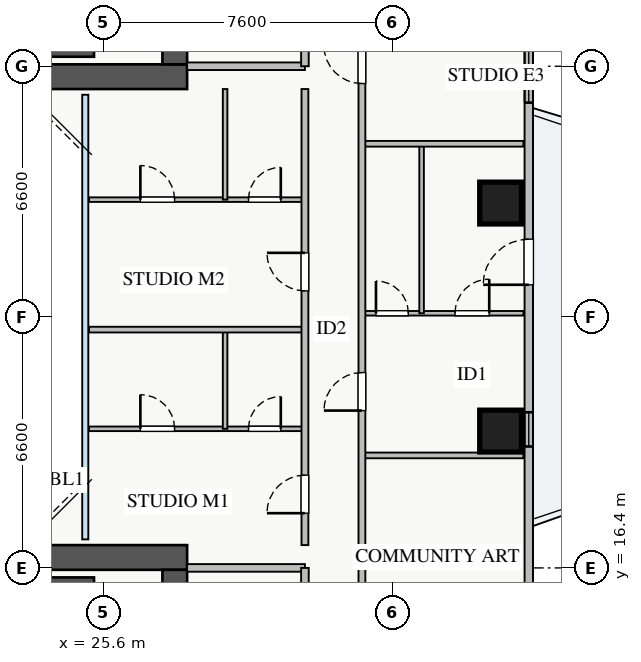
"""IFC4 building model, lengths in metres.
Left out: names, types, materials, properties, quantities, classifications, styles, units other than length and angle.
Written with IfcOpenShell. Run it as: python <this file> out.ifc"""

import sys

from ifc_helpers import new_model, si_unit, direction, frame, frame_2d, origin, origin_2d, place, context, subcontext, project, spatial, rectangle, extrude, source, transform, mapped, element, fill, save


model = new_model("IFC4")
c1 = context("Model", 3, precision=1e-05, world=origin(), true_north=direction((0.0, 1.0)))
c2 = subcontext(c1, "Body", "Model", "MODEL_VIEW")
j1 = project(units=[si_unit("LENGTHUNIT", "METRE"), si_unit("PLANEANGLEUNIT", "RADIAN")], contexts=[c1])
p1 = place(None, origin())
s1 = spatial("IfcSite", under=j1, at=p1, CompositionType="ELEMENT")
p2 = place(p1, origin())
s2 = spatial("IfcBuilding", under=s1, at=p2, CompositionType="ELEMENT")
p3 = place(p2, frame((0.0, 0.0, 103.5)))
s3 = spatial("IfcBuildingStorey", under=s2, at=p3, CompositionType="ELEMENT", Elevation=103.5)
for number, where, z_axis, x_axis in (
    (1, (18.2, 29.95, 0.0), (0.0, 0.0, 1.0), (1.0, 0.0, 0.0)),
    (2, (18.2, 16.05, 0.0), (0.0, 0.0, 1.0), (1.0, 0.0, 0.0)),
):
    element("IfcWall", number, at=place(p3, frame(where, z_axis=z_axis, x_axis=x_axis)), inside=s3, PredefinedType="SHEAR", context=c2, shape_type="SweptSolid", body=[
        extrude(rectangle(XDim=7.15, YDim=0.2, at=frame_2d((3.575, 0.0))), origin(), (0.0, 0.0, 1.0), 3.25),
    ])
p4 = place(p3, frame((10.2, 29.325, 0.0), z_axis=(0.0, 0.0, 1.0), x_axis=(1.0, 0.0, 0.0)))
e3 = element("IfcWall", 3, at=p4, inside=s3, PredefinedType="SHEAR", context=c2, shape_type="SweptSolid", body=[
    extrude(rectangle(XDim=17.6, YDim=0.65, at=frame_2d((8.8, 0.0))), origin(), (0.0, 0.0, 1.0), 3.25),
])
p5 = place(p3, frame((27.475, 29.65, 0.0), z_axis=(0.0, 0.0, 1.0), x_axis=(0.0, 1.0, 0.0)))
e4 = element("IfcWall", 4, at=p5, inside=s3, PredefinedType="SHEAR", context=c2, shape_type="SweptSolid", body=[
    extrude(rectangle(XDim=5.9, YDim=0.65, at=frame_2d((2.95, 0.0))), origin(), (0.0, 0.0, 1.0), 3.25),
])
p6 = place(p5, frame((1.1, 0.0, 0.0)))
e5 = element("IfcOpeningElement", 5, at=p6, cuts=e4, PredefinedType="OPENING", context=c2, shape_type="SweptSolid", body=[
    extrude(rectangle(XDim=1.3, YDim=2.05, at=frame_2d((0.65, 1.025))), frame((0.0, 0.335, 0.0), z_axis=(0.0, -1.0, 0.0), x_axis=(1.0, 0.0, 0.0)), (0.0, 0.0, 1.0), 0.67),
])
p7 = place(p3, frame((10.2, 16.675, 0.0), z_axis=(0.0, 0.0, 1.0), x_axis=(1.0, 0.0, 0.0)))
e6 = element("IfcWall", 6, at=p7, inside=s3, PredefinedType="SHEAR", context=c2, shape_type="SweptSolid", body=[
    extrude(rectangle(XDim=17.6, YDim=0.65, at=frame_2d((8.8, 0.0))), origin(), (0.0, 0.0, 1.0), 3.25),
])
p8 = place(p3, frame((27.475, 10.45, 0.0), z_axis=(0.0, 0.0, 1.0), x_axis=(0.0, 1.0, 0.0)))
e7 = element("IfcWall", 7, at=p8, inside=s3, PredefinedType="SHEAR", context=c2, shape_type="SweptSolid", body=[
    extrude(rectangle(XDim=5.9, YDim=0.65, at=frame_2d((2.95, 0.0))), origin(), (0.0, 0.0, 1.0), 3.25),
])
p9 = place(p8, frame((2.1, 0.0, 0.0)))
e8 = element("IfcOpeningElement", 8, at=p9, cuts=e7, PredefinedType="OPENING", context=c2, shape_type="SweptSolid", body=[
    extrude(rectangle(XDim=1.3, YDim=2.05, at=frame_2d((0.65, 1.025))), frame((0.0, 0.335, 0.0), z_axis=(0.0, -1.0, 0.0), x_axis=(1.0, 0.0, 0.0)), (0.0, 0.0, 1.0), 0.67),
])
m1 = source(origin(), c2, "Body", "SweptSolid", [
    extrude(rectangle(XDim=1.1, YDim=1.1, at=origin_2d()), origin(), (0.0, 0.0, 1.0), 3.25),
])
for number, where, z_axis, x_axis in (
    (9, (36.05, 20.0, 0.0), (0.0, 0.0, 1.0), (1.0, 0.0, 0.0)),
    (10, (36.05, 26.0, 0.0), (0.0, 0.0, 1.0), (1.0, 0.0, 0.0)),
):
    element("IfcColumn", number, at=place(p3, frame(where, z_axis=z_axis, x_axis=x_axis)), inside=s3, PredefinedType="COLUMN", context=c2, shape_type="MappedRepresentation", body=[
        mapped(m1, transform((0.0, 0.0, 0.0), x_axis=(1.0, 0.0, 0.0), y_axis=(0.0, 1.0, 0.0), z_axis=(0.0, 0.0, 1.0), scale=1.0)),
    ])
p10 = place(p3, frame((36.79, 10.55, 0.0), z_axis=(0.0, 0.0, 1.0), x_axis=(0.0, 1.0, 0.0)))
e11 = element("IfcWall", 11, at=p10, inside=s3, PredefinedType="STANDARD", context=c2, shape_type="SweptSolid", body=[
    extrude(rectangle(XDim=24.9, YDim=0.22, at=frame_2d((12.45, 0.0))), origin(), (0.0, 0.0, 1.0), 2.61),
])
p11 = place(p10, frame((13.3, 0.0, 0.0)))
e12 = element("IfcOpeningElement", 12, at=p11, cuts=e11, PredefinedType="OPENING", context=c2, shape_type="SweptSolid", body=[
    extrude(rectangle(XDim=1.2, YDim=2.1, at=frame_2d((0.6, 1.05))), frame((0.0, 0.12, 0.0), z_axis=(0.0, -1.0, 0.0), x_axis=(1.0, 0.0, 0.0)), (0.0, 0.0, 1.0), 0.24),
])
p12 = place(p10, frame((1.912, 0.0, 0.9)))
e13 = element("IfcOpeningElement", 13, at=p12, cuts=e11, PredefinedType="OPENING", context=c2, shape_type="SweptSolid", body=[
    extrude(rectangle(XDim=2.4, YDim=1.48, at=frame_2d((1.2, 0.74))), frame((0.0, 0.12, 0.0), z_axis=(0.0, -1.0, 0.0), x_axis=(1.0, 0.0, 0.0)), (0.0, 0.0, 1.0), 0.24),
])
p13 = place(p10, frame((22.165, 0.0, 0.9)))
e14 = element("IfcOpeningElement", 14, at=p13, cuts=e11, PredefinedType="OPENING", context=c2, shape_type="SweptSolid", body=[
    extrude(rectangle(XDim=2.1, YDim=1.5, at=frame_2d((1.05, 0.75))), frame((0.0, 0.12, 0.0), z_axis=(0.0, -1.0, 0.0), x_axis=(1.0, 0.0, 0.0)), (0.0, 0.0, 1.0), 0.24),
])
p14 = place(p10, frame((18.093, 0.0, 0.9)))
e15 = element("IfcOpeningElement", 15, at=p14, cuts=e11, PredefinedType="OPENING", context=c2, shape_type="SweptSolid", body=[
    extrude(rectangle(XDim=2.4, YDim=1.5, at=frame_2d((1.2, 0.75))), frame((0.0, 0.12, 0.0), z_axis=(0.0, -1.0, 0.0), x_axis=(1.0, 0.0, 0.0)), (0.0, 0.0, 1.0), 0.24),
])
p15 = place(p10, frame((9.045, 0.0, 0.9)))
e16 = element("IfcOpeningElement", 16, at=p15, cuts=e11, PredefinedType="OPENING", context=c2, shape_type="SweptSolid", body=[
    extrude(rectangle(XDim=0.9, YDim=1.2, at=frame_2d((0.45, 0.6))), frame((0.0, 0.12, 0.0), z_axis=(0.0, -1.0, 0.0), x_axis=(1.0, 0.0, 0.0)), (0.0, 0.0, 1.0), 0.24),
])
p16 = place(p3, frame((27.8, 29.6, 0.0), z_axis=(0.0, 0.0, 1.0), x_axis=(1.0, 0.0, 0.0)))
e17 = element("IfcWall", 17, at=p16, inside=s3, PredefinedType="PARTITIONING", context=c2, shape_type="SweptSolid", body=[
    extrude(rectangle(XDim=3.1, YDim=0.2, at=frame_2d((1.55, 0.0))), origin(), (0.0, 0.0, 1.0), 3.07),
])
p17 = place(p3, frame((30.9, 29.6, 0.0), z_axis=(0.0, 0.0, 1.0), x_axis=(0.0, 1.0, 0.0)))
e18 = element("IfcWall", 18, at=p17, inside=s3, PredefinedType="PARTITIONING", context=c2, shape_type="SweptSolid", body=[
    extrude(rectangle(XDim=3.9, YDim=0.2, at=frame_2d((1.95, 0.0))), origin(), (0.0, 0.0, 1.0), 3.07),
])
p18 = place(p17, frame((1.4, 0.0, 0.0)))
e19 = element("IfcOpeningElement", 19, at=p18, cuts=e18, PredefinedType="OPENING", context=c2, shape_type="SweptSolid", body=[
    extrude(rectangle(XDim=1.1, YDim=2.05, at=frame_2d((0.55, 1.025))), frame((0.0, 0.11, 0.0), z_axis=(0.0, -1.0, 0.0), x_axis=(1.0, 0.0, 0.0)), (0.0, 0.0, 1.0), 0.22),
])
p19 = place(p3, frame((27.8, 16.4, 0.0), z_axis=(0.0, 0.0, 1.0), x_axis=(1.0, 0.0, 0.0)))
e20 = element("IfcWall", 20, at=p19, inside=s3, PredefinedType="PARTITIONING", context=c2, shape_type="SweptSolid", body=[
    extrude(rectangle(XDim=3.1, YDim=0.2, at=frame_2d((1.55, 0.0))), origin(), (0.0, 0.0, 1.0), 3.07),
])
p20 = place(p3, frame((30.9, 12.5, 0.0), z_axis=(0.0, 0.0, 1.0), x_axis=(0.0, 1.0, 0.0)))
e21 = element("IfcWall", 21, at=p20, inside=s3, PredefinedType="PARTITIONING", context=c2, shape_type="SweptSolid", body=[
    extrude(rectangle(XDim=3.9, YDim=0.2, at=frame_2d((1.95, 0.0))), origin(), (0.0, 0.0, 1.0), 3.07),
])
p21 = place(p20, frame((1.4, 0.0, 0.0)))
e22 = element("IfcOpeningElement", 22, at=p21, cuts=e21, PredefinedType="OPENING", context=c2, shape_type="SweptSolid", body=[
    extrude(rectangle(XDim=1.1, YDim=2.05, at=frame_2d((0.55, 1.025))), frame((0.0, 0.11, 0.0), z_axis=(0.0, -1.0, 0.0), x_axis=(1.0, 0.0, 0.0)), (0.0, 0.0, 1.0), 0.22),
])
p22 = place(p3, frame((32.4, 23.1, 0.0), z_axis=(0.0, 0.0, 1.0), x_axis=(1.0, 0.0, 0.0)))
e23 = element("IfcWall", 23, at=p22, inside=s3, PredefinedType="PLUMBINGWALL", context=c2, shape_type="SweptSolid", body=[
    extrude(rectangle(XDim=4.25, YDim=0.12, at=frame_2d((2.125, 0.0))), origin(), (0.0, 0.0, 1.0), 3.07),
])
p23 = place(p22, frame((0.37, 0.0, 0.0)))
e24 = element("IfcOpeningElement", 24, at=p23, cuts=e23, PredefinedType="OPENING", context=c2, shape_type="SweptSolid", body=[
    extrude(rectangle(XDim=0.85, YDim=2.05, at=frame_2d((0.425, 1.025))), frame((0.0, 0.07, 0.0), z_axis=(0.0, -1.0, 0.0), x_axis=(1.0, 0.0, 0.0)), (0.0, 0.0, 1.0), 0.14),
])
p24 = place(p22, frame((2.45, 0.0, 0.0)))
e25 = element("IfcOpeningElement", 25, at=p24, cuts=e23, PredefinedType="OPENING", context=c2, shape_type="SweptSolid", body=[
    extrude(rectangle(XDim=0.9, YDim=2.05, at=frame_2d((0.45, 1.025))), frame((0.0, 0.07, 0.0), z_axis=(0.0, -1.0, 0.0), x_axis=(1.0, 0.0, 0.0)), (0.0, 0.0, 1.0), 0.14),
])
p25 = place(p3, frame((33.97, 23.1, 0.0), z_axis=(0.0, 0.0, 1.0), x_axis=(0.0, 1.0, 0.0)))
e26 = element("IfcWall", 26, at=p25, inside=s3, PredefinedType="PLUMBINGWALL", context=c2, shape_type="SweptSolid", body=[
    extrude(rectangle(XDim=4.46, YDim=0.12, at=frame_2d((2.23, 0.0))), origin(), (0.0, 0.0, 1.0), 3.07),
])
for number, where, z_axis, x_axis in (
    (27, (32.4, 19.36, 0.0), (0.0, 0.0, 1.0), (1.0, 0.0, 0.0)),
    (28, (32.4, 27.56, 0.0), (0.0, 0.0, 1.0), (1.0, 0.0, 0.0)),
):
    element("IfcWall", number, at=place(p3, frame(where, z_axis=z_axis, x_axis=x_axis)), inside=s3, PredefinedType="PARTITIONING", context=c2, shape_type="SweptSolid", body=[
        extrude(rectangle(XDim=4.25, YDim=0.15, at=frame_2d((2.125, 0.0))), origin(), (0.0, 0.0, 1.0), 3.07),
    ])
p26 = place(p3, frame((32.4, 8.31, 0.0), z_axis=(0.0, 0.0, 1.0), x_axis=(0.0, 1.0, 0.0)))
e29 = element("IfcWall", 29, at=p26, inside=s3, PredefinedType="PARTITIONING", context=c2, shape_type="SweptSolid", body=[
    extrude(rectangle(XDim=29.13, YDim=0.18, at=frame_2d((14.565, 0.0))), origin(), (0.0, 0.0, 1.0), 3.07),
])
p27 = place(p26, frame((27.94, 0.0, 0.0)))
e30 = element("IfcOpeningElement", 30, at=p27, cuts=e29, PredefinedType="OPENING", context=c2, shape_type="SweptSolid", body=[
    extrude(rectangle(XDim=0.9, YDim=2.05, at=frame_2d((0.45, 1.025))), frame((0.0, 0.1, 0.0), z_axis=(0.0, -1.0, 0.0), x_axis=(1.0, 0.0, 0.0)), (0.0, 0.0, 1.0), 0.2),
])
p28 = place(p26, frame((0.415, 0.0, 0.0)))
e31 = element("IfcOpeningElement", 31, at=p28, cuts=e29, PredefinedType="OPENING", context=c2, shape_type="SweptSolid", body=[
    extrude(rectangle(XDim=0.9, YDim=2.05, at=frame_2d((0.45, 1.025))), frame((0.0, 0.1, 0.0), z_axis=(0.0, -1.0, 0.0), x_axis=(1.0, 0.0, 0.0)), (0.0, 0.0, 1.0), 0.2),
])
p29 = place(p26, frame((5.88, 0.0, 0.0)))
e32 = element("IfcOpeningElement", 32, at=p29, cuts=e29, PredefinedType="OPENING", context=c2, shape_type="SweptSolid", body=[
    extrude(rectangle(XDim=1.0, YDim=2.05, at=frame_2d((0.5, 1.025))), frame((0.0, 0.1, 0.0), z_axis=(0.0, -1.0, 0.0), x_axis=(1.0, 0.0, 0.0)), (0.0, 0.0, 1.0), 0.2),
])
p30 = place(p26, frame((12.23, 0.0, 0.0)))
e33 = element("IfcOpeningElement", 33, at=p30, cuts=e29, PredefinedType="OPENING", context=c2, shape_type="SweptSolid", body=[
    extrude(rectangle(XDim=1.0, YDim=2.05, at=frame_2d((0.5, 1.025))), frame((0.0, 0.1, 0.0), z_axis=(0.0, -1.0, 0.0), x_axis=(1.0, 0.0, 0.0)), (0.0, 0.0, 1.0), 0.2),
])
p31 = place(p26, frame((20.835, 0.0, 0.0)))
e34 = element("IfcOpeningElement", 34, at=p31, cuts=e29, PredefinedType="OPENING", context=c2, shape_type="SweptSolid", body=[
    extrude(rectangle(XDim=1.0, YDim=2.05, at=frame_2d((0.5, 1.025))), frame((0.0, 0.1, 0.0), z_axis=(0.0, -1.0, 0.0), x_axis=(1.0, 0.0, 0.0)), (0.0, 0.0, 1.0), 0.2),
])
p32 = place(p3, frame((25.22, 20.06, 0.0), z_axis=(0.0, 0.0, 1.0), x_axis=(1.0, 0.0, 0.0)))
e35 = element("IfcWall", 35, at=p32, inside=s3, PredefinedType="PLUMBINGWALL", context=c2, shape_type="SweptSolid", body=[
    extrude(rectangle(XDim=5.68, YDim=0.12, at=frame_2d((2.84, 0.0))), origin(), (0.0, 0.0, 1.0), 2.625),
])
p33 = place(p32, frame((1.35, 0.0, 0.0)))
e36 = element("IfcOpeningElement", 36, at=p33, cuts=e35, PredefinedType="OPENING", context=c2, shape_type="SweptSolid", body=[
    extrude(rectangle(XDim=0.9, YDim=2.05, at=frame_2d((0.45, 1.025))), frame((0.0, 0.07, 0.0), z_axis=(0.0, -1.0, 0.0), x_axis=(1.0, 0.0, 0.0)), (0.0, 0.0, 1.0), 0.14),
])
p34 = place(p32, frame((4.195, 0.0, 0.0)))
e37 = element("IfcOpeningElement", 37, at=p34, cuts=e35, PredefinedType="OPENING", context=c2, shape_type="SweptSolid", body=[
    extrude(rectangle(XDim=0.85, YDim=2.05, at=frame_2d((0.425, 1.025))), frame((0.0, 0.07, 0.0), z_axis=(0.0, -1.0, 0.0), x_axis=(1.0, 0.0, 0.0)), (0.0, 0.0, 1.0), 0.14),
])
p35 = place(p3, frame((28.8, 20.06, 0.0), z_axis=(0.0, 0.0, 1.0), x_axis=(0.0, 1.0, 0.0)))
e38 = element("IfcWall", 38, at=p35, inside=s3, PredefinedType="PLUMBINGWALL", context=c2, shape_type="SweptSolid", body=[
    extrude(rectangle(XDim=2.61, YDim=0.12, at=frame_2d((1.305, 0.0))), origin(), (0.0, 0.0, 1.0), 3.07),
])
p36 = place(p3, frame((25.22, 26.09, 0.0), z_axis=(0.0, 0.0, 1.0), x_axis=(1.0, 0.0, 0.0)))
e39 = element("IfcWall", 39, at=p36, inside=s3, PredefinedType="PLUMBINGWALL", context=c2, shape_type="SweptSolid", body=[
    extrude(rectangle(XDim=5.68, YDim=0.12, at=frame_2d((2.84, 0.0))), origin(), (0.0, 0.0, 1.0), 2.625),
])
p37 = place(p36, frame((1.35, 0.0, 0.0)))
e40 = element("IfcOpeningElement", 40, at=p37, cuts=e39, PredefinedType="OPENING", context=c2, shape_type="SweptSolid", body=[
    extrude(rectangle(XDim=0.9, YDim=2.05, at=frame_2d((0.45, 1.025))), frame((0.0, 0.07, 0.0), z_axis=(0.0, -1.0, 0.0), x_axis=(1.0, 0.0, 0.0)), (0.0, 0.0, 1.0), 0.14),
])
p38 = place(p36, frame((4.195, 0.0, 0.0)))
e41 = element("IfcOpeningElement", 41, at=p38, cuts=e39, PredefinedType="OPENING", context=c2, shape_type="SweptSolid", body=[
    extrude(rectangle(XDim=0.85, YDim=2.05, at=frame_2d((0.425, 1.025))), frame((0.0, 0.07, 0.0), z_axis=(0.0, -1.0, 0.0), x_axis=(1.0, 0.0, 0.0)), (0.0, 0.0, 1.0), 0.14),
])
p39 = place(p3, frame((28.8, 26.09, 0.0), z_axis=(0.0, 0.0, 1.0), x_axis=(0.0, 1.0, 0.0)))
e42 = element("IfcWall", 42, at=p39, inside=s3, PredefinedType="PLUMBINGWALL", context=c2, shape_type="SweptSolid", body=[
    extrude(rectangle(XDim=2.91, YDim=0.12, at=frame_2d((1.455, 0.0))), origin(), (0.0, 0.0, 1.0), 3.07),
])
p40 = place(p3, frame((25.22, 22.67, 0.0), z_axis=(0.0, 0.0, 1.0), x_axis=(1.0, 0.0, 0.0)))
e43 = element("IfcWall", 43, at=p40, inside=s3, PredefinedType="PARTITIONING", context=c2, shape_type="SweptSolid", body=[
    extrude(rectangle(XDim=5.68, YDim=0.15, at=frame_2d((2.84, 0.0))), origin(), (0.0, 0.0, 1.0), 3.07),
])
p41 = place(p3, frame((30.9, 17.0, 0.0), z_axis=(0.0, 0.0, 1.0), x_axis=(0.0, 1.0, 0.0)))
e44 = element("IfcWall", 44, at=p41, inside=s3, PredefinedType="PARTITIONING", context=c2, shape_type="SweptSolid", body=[
    extrude(rectangle(XDim=12.0, YDim=0.18, at=frame_2d((6.0, 0.0))), origin(), (0.0, 0.0, 1.0), 3.07),
])
p42 = place(p41, frame((0.84, 0.0, 0.0)))
e45 = element("IfcOpeningElement", 45, at=p42, cuts=e44, PredefinedType="OPENING", context=c2, shape_type="SweptSolid", body=[
    extrude(rectangle(XDim=1.0, YDim=2.05, at=frame_2d((0.5, 1.025))), frame((0.0, 0.1, 0.0), z_axis=(0.0, -1.0, 0.0), x_axis=(1.0, 0.0, 0.0)), (0.0, 0.0, 1.0), 0.2),
])
p43 = place(p41, frame((6.69, 0.0, 0.0)))
e46 = element("IfcOpeningElement", 46, at=p43, cuts=e44, PredefinedType="OPENING", context=c2, shape_type="SweptSolid", body=[
    extrude(rectangle(XDim=1.0, YDim=2.05, at=frame_2d((0.5, 1.025))), frame((0.0, 0.1, 0.0), z_axis=(0.0, -1.0, 0.0), x_axis=(1.0, 0.0, 0.0)), (0.0, 0.0, 1.0), 0.2),
])
m2 = source(origin(), c2, "Body", "SweptSolid", [
    extrude(rectangle(XDim=1.2, YDim=2.1, at=frame_2d((0.6, 1.05))), frame((0.0, 0.025, 0.0), z_axis=(0.0, -1.0, 0.0), x_axis=(1.0, 0.0, 0.0)), (0.0, 0.0, 1.0), 0.05),
])
p44 = place(p11, origin())
e47 = element("IfcDoor", 47, at=p44, inside=s3, OperationType="SINGLE_SWING_LEFT", PredefinedType="DOOR", context=c2, shape_type="MappedRepresentation", body=[
    mapped(m2, transform((0.0, 0.0, 0.0), x_axis=(1.0, 0.0, 0.0), y_axis=(0.0, 1.0, 0.0), z_axis=(0.0, 0.0, 1.0), scale=1.0)),
])
fill(e12, e47)
m3 = source(origin(), c2, "Body", "SweptSolid", [
    extrude(rectangle(XDim=0.85, YDim=2.05, at=frame_2d((0.425, 1.025))), frame((0.0, 0.025, 0.0), z_axis=(0.0, -1.0, 0.0), x_axis=(1.0, 0.0, 0.0)), (0.0, 0.0, 1.0), 0.05),
])
p45 = place(p23, origin())
e48 = element("IfcDoor", 48, at=p45, inside=s3, OperationType="SINGLE_SWING_LEFT", PredefinedType="DOOR", context=c2, shape_type="MappedRepresentation", body=[
    mapped(m3, transform((0.0, 0.0, 0.0), x_axis=(1.0, 0.0, 0.0), y_axis=(0.0, 1.0, 0.0), z_axis=(0.0, 0.0, 1.0), scale=1.0)),
])
fill(e24, e48)
m4 = source(origin(), c2, "Body", "SweptSolid", [
    extrude(rectangle(XDim=0.9, YDim=2.05, at=frame_2d((0.45, 1.025))), frame((0.0, 0.025, 0.0), z_axis=(0.0, -1.0, 0.0), x_axis=(1.0, 0.0, 0.0)), (0.0, 0.0, 1.0), 0.05),
])
p46 = place(p24, origin())
e49 = element("IfcDoor", 49, at=p46, inside=s3, OperationType="SINGLE_SWING_RIGHT", PredefinedType="DOOR", context=c2, shape_type="MappedRepresentation", body=[
    mapped(m4, transform((0.0, 0.0, 0.0), x_axis=(1.0, 0.0, 0.0), y_axis=(0.0, 1.0, 0.0), z_axis=(0.0, 0.0, 1.0), scale=1.0)),
])
fill(e25, e49)
m5 = source(origin(), c2, "Body", "SweptSolid", [
    extrude(rectangle(XDim=1.0, YDim=2.05, at=frame_2d((0.5, 1.025))), frame((0.0, 0.025, 0.0), z_axis=(0.0, -1.0, 0.0), x_axis=(1.0, 0.0, 0.0)), (0.0, 0.0, 1.0), 0.05),
])
p47 = place(p30, origin())
e50 = element("IfcDoor", 50, at=p47, inside=s3, OperationType="SINGLE_SWING_LEFT", PredefinedType="DOOR", context=c2, shape_type="MappedRepresentation", body=[
    mapped(m5, transform((0.0, 0.0, 0.0), x_axis=(1.0, 0.0, 0.0), y_axis=(0.0, 1.0, 0.0), z_axis=(0.0, 0.0, 1.0), scale=1.0)),
])
fill(e33, e50)
p48 = place(p31, origin())
e51 = element("IfcDoor", 51, at=p48, inside=s3, OperationType="SINGLE_SWING_RIGHT", PredefinedType="DOOR", context=c2, shape_type="MappedRepresentation", body=[
    mapped(m5, transform((0.0, 0.0, 0.0), x_axis=(1.0, 0.0, 0.0), y_axis=(0.0, 1.0, 0.0), z_axis=(0.0, 0.0, 1.0), scale=1.0)),
])
fill(e34, e51)
p49 = place(p33, origin())
e52 = element("IfcDoor", 52, at=p49, inside=s3, OperationType="SINGLE_SWING_LEFT", PredefinedType="DOOR", context=c2, shape_type="MappedRepresentation", body=[
    mapped(m4, transform((0.0, 0.0, 0.0), x_axis=(1.0, 0.0, 0.0), y_axis=(0.0, 1.0, 0.0), z_axis=(0.0, 0.0, 1.0), scale=1.0)),
])
fill(e36, e52)
p50 = place(p34, origin())
e53 = element("IfcDoor", 53, at=p50, inside=s3, OperationType="SINGLE_SWING_RIGHT", PredefinedType="DOOR", context=c2, shape_type="MappedRepresentation", body=[
    mapped(m3, transform((0.0, 0.0, 0.0), x_axis=(1.0, 0.0, 0.0), y_axis=(0.0, 1.0, 0.0), z_axis=(0.0, 0.0, 1.0), scale=1.0)),
])
fill(e37, e53)
p51 = place(p37, origin())
e54 = element("IfcDoor", 54, at=p51, inside=s3, OperationType="SINGLE_SWING_LEFT", PredefinedType="DOOR", context=c2, shape_type="MappedRepresentation", body=[
    mapped(m4, transform((0.0, 0.0, 0.0), x_axis=(1.0, 0.0, 0.0), y_axis=(0.0, 1.0, 0.0), z_axis=(0.0, 0.0, 1.0), scale=1.0)),
])
fill(e40, e54)
p52 = place(p38, origin())
e55 = element("IfcDoor", 55, at=p52, inside=s3, OperationType="SINGLE_SWING_RIGHT", PredefinedType="DOOR", context=c2, shape_type="MappedRepresentation", body=[
    mapped(m3, transform((0.0, 0.0, 0.0), x_axis=(1.0, 0.0, 0.0), y_axis=(0.0, 1.0, 0.0), z_axis=(0.0, 0.0, 1.0), scale=1.0)),
])
fill(e41, e55)
p53 = place(p42, origin())
e56 = element("IfcDoor", 56, at=p53, inside=s3, OperationType="SINGLE_SWING_LEFT", PredefinedType="DOOR", context=c2, shape_type="MappedRepresentation", body=[
    mapped(m5, transform((0.0, 0.0, 0.0), x_axis=(1.0, 0.0, 0.0), y_axis=(0.0, 1.0, 0.0), z_axis=(0.0, 0.0, 1.0), scale=1.0)),
])
fill(e45, e56)
p54 = place(p43, origin())
e57 = element("IfcDoor", 57, at=p54, inside=s3, OperationType="SINGLE_SWING_RIGHT", PredefinedType="DOOR", context=c2, shape_type="MappedRepresentation", body=[
    mapped(m5, transform((0.0, 0.0, 0.0), x_axis=(1.0, 0.0, 0.0), y_axis=(0.0, 1.0, 0.0), z_axis=(0.0, 0.0, 1.0), scale=1.0)),
])
fill(e46, e57)
m6 = source(origin(), c2, "Body", "SweptSolid", [
    extrude(rectangle(XDim=2.4, YDim=1.5, at=frame_2d((1.2, 0.75))), frame((0.0, 0.03, 0.0), z_axis=(0.0, -1.0, 0.0), x_axis=(1.0, 0.0, 0.0)), (0.0, 0.0, 1.0), 0.06),
])
p55 = place(p14, origin())
e58 = element("IfcWindow", 58, at=p55, inside=s3, PartitioningType="TRIPLE_PANEL_VERTICAL", PredefinedType="WINDOW", context=c2, shape_type="MappedRepresentation", body=[
    mapped(m6, transform((0.0, 0.0, 0.0), x_axis=(1.0, 0.0, 0.0), y_axis=(0.0, 1.0, 0.0), z_axis=(0.0, 0.0, 1.0), scale=1.0)),
])
fill(e15, e58)
m7 = source(origin(), c2, "Body", "SweptSolid", [
    extrude(rectangle(XDim=0.9, YDim=1.2, at=frame_2d((0.45, 0.6))), frame((0.0, 0.03, 0.0), z_axis=(0.0, -1.0, 0.0), x_axis=(1.0, 0.0, 0.0)), (0.0, 0.0, 1.0), 0.06),
])
p56 = place(p15, origin())
e59 = element("IfcWindow", 59, at=p56, inside=s3, PartitioningType="SINGLE_PANEL", PredefinedType="WINDOW", context=c2, shape_type="MappedRepresentation", body=[
    mapped(m7, transform((0.0, 0.0, 0.0), x_axis=(1.0, 0.0, 0.0), y_axis=(0.0, 1.0, 0.0), z_axis=(0.0, 0.0, 1.0), scale=1.0)),
])
fill(e16, e59)
save(model, sys.argv[1])
